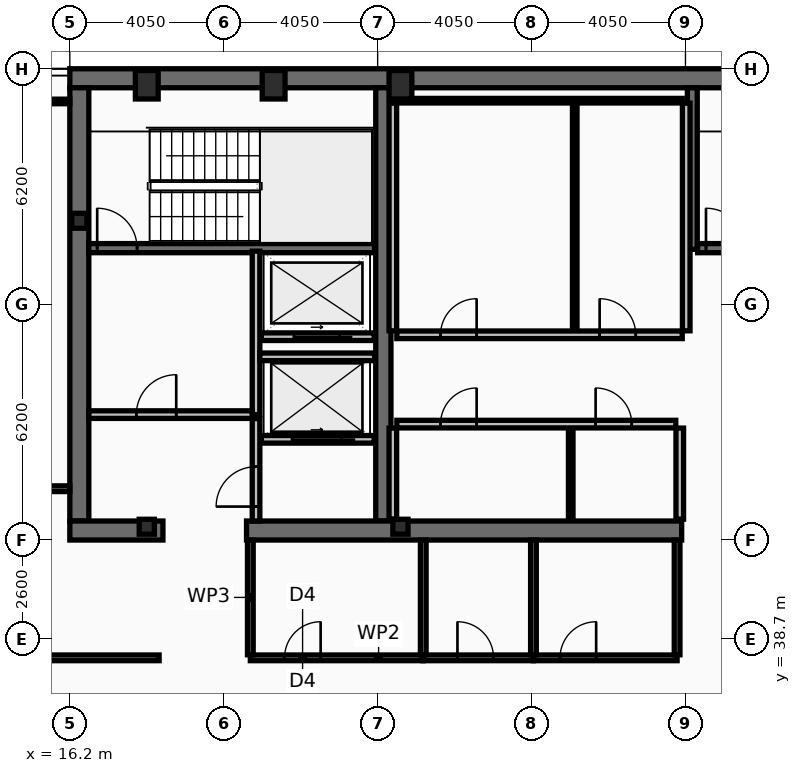
"""IFC4 building model, lengths in metres.
Left out: names, types, materials, properties, quantities, classifications, styles, units other than length and angle.
Written with IfcOpenShell. Run it as: python <this file> out.ifc"""

import sys

from ifc_helpers import new_model, si_unit, direction, frame, frame_2d, origin, origin_2d, place, context, subcontext, project, spatial, rectangle, hollow_rectangle, i_section, extrude, element, fill, save


model = new_model("IFC4")
c1 = context("Model", 3, precision=1e-05, world=origin(), true_north=direction((0.0, 1.0)))
c2 = subcontext(c1, "Body", "Model", "MODEL_VIEW")
j1 = project(units=[si_unit("LENGTHUNIT", "METRE"), si_unit("PLANEANGLEUNIT", "RADIAN")], contexts=[c1])
p1 = place(None, origin())
s1 = spatial("IfcSite", under=j1, at=p1, CompositionType="ELEMENT")
p2 = place(p1, origin())
s2 = spatial("IfcBuilding", under=s1, at=p2, CompositionType="ELEMENT")
p3 = place(p2, frame((0.0, 0.0, 277.0)))
s3 = spatial("IfcBuildingStorey", under=s2, at=p3, CompositionType="ELEMENT", Elevation=277.0)
p4 = place(p3, frame((16.2, 53.45, 0.0), z_axis=(0.0, 0.0, 1.0), x_axis=(1.0, 0.0, 0.0)))
e1 = element("IfcWall", 1, at=p4, inside=s3, PredefinedType="SHEAR", context=c2, shape_type="SweptSolid", body=[
    extrude(rectangle(XDim=40.5, YDim=0.5, at=frame_2d((20.25, 0.0))), origin(), (0.0, 0.0, 1.0), 3.44),
])
p5 = place(p3, frame((16.45, 41.8, 0.0), z_axis=(0.0, 0.0, 1.0), x_axis=(0.0, 1.0, 0.0)))
e2 = element("IfcWall", 2, at=p5, inside=s3, PredefinedType="SHEAR", context=c2, shape_type="SweptSolid", body=[
    extrude(rectangle(XDim=11.4, YDim=0.5, at=frame_2d((5.7, 0.0))), origin(), (0.0, 0.0, 1.0), 3.44),
])
p6 = place(p3, frame((24.45, 41.8, 0.0), z_axis=(0.0, 0.0, 1.0), x_axis=(0.0, 1.0, 0.0)))
e3 = element("IfcWall", 3, at=p6, inside=s3, PredefinedType="SHEAR", context=c2, shape_type="SweptSolid", body=[
    extrude(rectangle(XDim=11.4, YDim=0.4, at=frame_2d((5.7, 0.0))), origin(), (0.0, 0.0, 1.0), 3.44),
])
p7 = place(p3, frame((18.65, 41.55, 0.0), z_axis=(0.0, 0.0, 1.0), x_axis=(-1.0, 0.0, 0.0)))
e4 = element("IfcWall", 4, at=p7, inside=s3, PredefinedType="SHEAR", context=c2, shape_type="SweptSolid", body=[
    extrude(rectangle(XDim=2.45, YDim=0.5, at=frame_2d((1.225, 0.0))), origin(), (0.0, 0.0, 1.0), 3.44),
])
p8 = place(p3, frame((32.3, 41.55, 0.0), z_axis=(0.0, 0.0, 1.0), x_axis=(-1.0, 0.0, 0.0)))
e5 = element("IfcWall", 5, at=p8, inside=s3, PredefinedType="SHEAR", context=c2, shape_type="SweptSolid", body=[
    extrude(rectangle(XDim=11.45, YDim=0.5, at=frame_2d((5.725, 0.0))), origin(), (0.0, 0.0, 1.0), 3.44),
])
p9 = place(p3, frame((32.58, 48.95, 0.0), z_axis=(0.0, 0.0, 1.0), x_axis=(0.0, 1.0, 0.0)))
e6 = element("IfcWall", 6, at=p9, inside=s3, PredefinedType="SHEAR", context=c2, shape_type="SweptSolid", body=[
    extrude(rectangle(XDim=4.25, YDim=0.26, at=frame_2d((2.125, 0.0))), origin(), (0.0, 0.0, 1.0), 3.44),
])
p10 = place(p3, frame((16.7, 48.98, 0.0), z_axis=(0.0, 0.0, 1.0), x_axis=(1.0, 0.0, 0.0)))
e7 = element("IfcWall", 7, at=p10, inside=s3, PredefinedType="SHEAR", context=c2, shape_type="SweptSolid", body=[
    extrude(rectangle(XDim=7.52, YDim=0.24, at=frame_2d((3.76, 0.0))), origin(), (0.0, 0.0, 1.0), 3.44),
])
p11 = place(p10, frame((0.22, 0.0, 0.0)))
e8 = element("IfcOpeningElement", 8, at=p11, cuts=e7, PredefinedType="OPENING", context=c2, shape_type="SweptSolid", body=[
    extrude(rectangle(XDim=1.05, YDim=2.15, at=frame_2d((0.525, 1.075))), frame((0.0, 0.13, 0.0), z_axis=(0.0, -1.0, 0.0), x_axis=(1.0, 0.0, 0.0)), (0.0, 0.0, 1.0), 0.26),
])
p12 = place(p3, frame((32.72, 48.98, 0.0), z_axis=(0.0, 0.0, 1.0), x_axis=(1.0, 0.0, 0.0)))
e9 = element("IfcWall", 9, at=p12, inside=s3, PredefinedType="SHEAR", context=c2, shape_type="SweptSolid", body=[
    extrude(rectangle(XDim=7.56, YDim=0.24, at=frame_2d((3.78, 0.0))), origin(), (0.0, 0.0, 1.0), 3.44),
])
p13 = place(p12, frame((0.22, 0.0, 0.0)))
e10 = element("IfcOpeningElement", 10, at=p13, cuts=e9, PredefinedType="OPENING", context=c2, shape_type="SweptSolid", body=[
    extrude(rectangle(XDim=1.05, YDim=2.15, at=frame_2d((0.525, 1.075))), frame((0.0, 0.13, 0.0), z_axis=(0.0, -1.0, 0.0), x_axis=(1.0, 0.0, 0.0)), (0.0, 0.0, 1.0), 0.26),
])
for number, where, z_axis, x_axis in (
    (11, (18.225, 53.28, 0.0), (0.0, 0.0, 1.0), (1.0, 0.0, 0.0)),
    (12, (21.562, 53.28, 0.0), (0.0, 0.0, 1.0), (1.0, 0.0, 0.0)),
    (13, (24.9, 53.28, 0.0), (0.0, 0.0, 1.0), (1.0, 0.0, 0.0)),
):
    element("IfcColumn", number, at=place(p3, frame(where, z_axis=z_axis, x_axis=x_axis)), inside=s3, PredefinedType="COLUMN", context=c2, shape_type="SweptSolid", body=[
        extrude(hollow_rectangle(XDim=0.6, YDim=0.75, WallThickness=0.045, at=origin_2d()), origin(), (0.0, 0.0, 1.0), 3.6),
    ])
for number, where, z_axis, x_axis in (
    (14, (16.45, 49.7, 0.0), (0.0, 0.0, 1.0), (1.0, 0.0, 0.0)),
    (15, (18.225, 41.65, 0.0), (0.0, 0.0, 1.0), (1.0, 0.0, 0.0)),
    (16, (24.9, 41.65, 0.0), (0.0, 0.0, 1.0), (1.0, 0.0, 0.0)),
):
    element("IfcColumn", number, at=place(p3, frame(where, z_axis=z_axis, x_axis=x_axis)), inside=s3, PredefinedType="COLUMN", context=c2, shape_type="SweptSolid", body=[
        extrude(i_section(OverallWidth=0.399, OverallDepth=0.393, WebThickness=0.023, FlangeThickness=0.037, at=origin_2d()), origin(), (0.0, 0.0, 1.0), 3.6),
    ])
p14 = place(p3, frame((24.21, 43.95, 0.0), z_axis=(0.0, 0.0, 1.0), x_axis=(-1.0, 0.0, 0.0)))
e17 = element("IfcWall", 17, at=p14, inside=s3, PredefinedType="PARTITIONING", context=c2, shape_type="SweptSolid", body=[
    extrude(rectangle(XDim=2.97, YDim=0.2, at=frame_2d((1.485, 0.0))), origin(), (0.0, 0.0, 1.0), 3.44),
])
p15 = place(p14, frame((0.86, 0.0, 0.0)))
e18 = element("IfcOpeningElement", 18, at=p15, cuts=e17, PredefinedType="OPENING", context=c2, shape_type="SweptSolid", body=[
    extrude(rectangle(XDim=1.3, YDim=2.18, at=frame_2d((0.65, 1.09))), frame((0.0, 0.11, 0.0), z_axis=(0.0, -1.0, 0.0), x_axis=(1.0, 0.0, 0.0)), (0.0, 0.0, 1.0), 0.22),
])
p16 = place(p3, frame((24.21, 46.65, 0.0), z_axis=(0.0, 0.0, 1.0), x_axis=(-1.0, 0.0, 0.0)))
e19 = element("IfcWall", 19, at=p16, inside=s3, PredefinedType="PARTITIONING", context=c2, shape_type="SweptSolid", body=[
    extrude(rectangle(XDim=2.97, YDim=0.2, at=frame_2d((1.485, 0.0))), origin(), (0.0, 0.0, 1.0), 3.44),
])
p17 = place(p16, frame((0.91, 0.0, 0.0)))
e20 = element("IfcOpeningElement", 20, at=p17, cuts=e19, PredefinedType="OPENING", context=c2, shape_type="SweptSolid", body=[
    extrude(rectangle(XDim=1.2, YDim=2.18, at=frame_2d((0.6, 1.09))), frame((0.0, 0.11, 0.0), z_axis=(0.0, -1.0, 0.0), x_axis=(1.0, 0.0, 0.0)), (0.0, 0.0, 1.0), 0.22),
])
p18 = place(p3, frame((21.1, 44.6, 0.0), z_axis=(0.0, 0.0, 1.0), x_axis=(0.0, 1.0, 0.0)))
e21 = element("IfcWall", 21, at=p18, inside=s3, PredefinedType="PARTITIONING", context=c2, shape_type="SweptSolid", body=[
    extrude(rectangle(XDim=4.3, YDim=0.2, at=frame_2d((2.15, 0.0))), origin(), (0.0, 0.0, 1.0), 3.44),
])
p19 = place(p3, frame((16.7, 44.6, 0.0), z_axis=(0.0, 0.0, 1.0), x_axis=(1.0, 0.0, 0.0)))
e22 = element("IfcWall", 22, at=p19, inside=s3, PredefinedType="PARTITIONING", context=c2, shape_type="SweptSolid", body=[
    extrude(rectangle(XDim=4.3, YDim=0.2, at=frame_2d((2.15, 0.0))), origin(), (0.0, 0.0, 1.0), 3.44),
])
p20 = place(p19, frame((1.25, 0.0, 0.0)))
e23 = element("IfcOpeningElement", 23, at=p20, cuts=e22, PredefinedType="OPENING", context=c2, shape_type="SweptSolid", body=[
    extrude(rectangle(XDim=1.05, YDim=2.15, at=frame_2d((0.525, 1.075))), frame((0.0, 0.11, 0.0), z_axis=(0.0, -1.0, 0.0), x_axis=(1.0, 0.0, 0.0)), (0.0, 0.0, 1.0), 0.22),
])
p21 = place(p3, frame((21.2, 46.12, 0.0), z_axis=(0.0, 0.0, 1.0), x_axis=(1.0, 0.0, 0.0)))
e24 = element("IfcWall", 24, at=p21, inside=s3, PredefinedType="PARTITIONING", context=c2, shape_type="SweptSolid", body=[
    extrude(rectangle(XDim=3.02, YDim=0.2, at=frame_2d((1.51, 0.0))), origin(), (0.0, 0.0, 1.0), 3.44),
])
p22 = place(p3, frame((21.1, 41.8, 0.0), z_axis=(0.0, 0.0, 1.0), x_axis=(0.0, 1.0, 0.0)))
e25 = element("IfcWall", 25, at=p22, inside=s3, PredefinedType="PARTITIONING", context=c2, shape_type="SweptSolid", body=[
    extrude(rectangle(XDim=2.695, YDim=0.2, at=frame_2d((1.348, 0.0))), origin(), (0.0, 0.0, 1.0), 3.44),
])
p23 = place(p22, frame((0.38, 0.0, 0.0)))
e26 = element("IfcOpeningElement", 26, at=p23, cuts=e25, PredefinedType="OPENING", context=c2, shape_type="SweptSolid", body=[
    extrude(rectangle(XDim=1.05, YDim=2.15, at=frame_2d((0.525, 1.075))), frame((0.0, 0.11, 0.0), z_axis=(0.0, -1.0, 0.0), x_axis=(1.0, 0.0, 0.0)), (0.0, 0.0, 1.0), 0.22),
])
for number, where, z_axis, x_axis in (
    (27, (24.7, 46.805, 0.0), (0.0, 0.0, 1.0), (0.0, 1.0, 0.0)),
    (28, (32.42, 46.805, 0.0), (0.0, 0.0, 1.0), (0.0, 1.0, 0.0)),
):
    element("IfcWall", number, at=place(p3, frame(where, z_axis=z_axis, x_axis=x_axis)), inside=s3, PredefinedType="PARTITIONING", context=c2, shape_type="SweptSolid", body=[
        extrude(rectangle(XDim=5.99, YDim=0.2, at=frame_2d((2.995, 0.0))), origin(), (0.0, 0.0, 1.0), 3.44),
    ])
p24 = place(p3, frame((24.805, 52.86, 0.0), z_axis=(0.0, 0.0, 1.0), x_axis=(1.0, 0.0, 0.0)))
e29 = element("IfcWall", 29, at=p24, inside=s3, PredefinedType="PARTITIONING", context=c2, shape_type="SweptSolid", body=[
    extrude(rectangle(XDim=7.51, YDim=0.12, at=frame_2d((3.755, 0.0))), origin(), (0.0, 0.0, 1.0), 3.44),
])
p25 = place(p3, frame((29.486, 46.805, 0.0), z_axis=(0.0, 0.0, 1.0), x_axis=(0.0, 1.0, 0.0)))
e30 = element("IfcWall", 30, at=p25, inside=s3, PredefinedType="PARTITIONING", context=c2, shape_type="SweptSolid", body=[
    extrude(rectangle(XDim=5.99, YDim=0.12, at=frame_2d((2.995, 0.0))), origin(), (0.0, 0.0, 1.0), 3.44),
])
p26 = place(p3, frame((24.805, 46.7, 0.0), z_axis=(0.0, 0.0, 1.0), x_axis=(1.0, 0.0, 0.0)))
e31 = element("IfcWall", 31, at=p26, inside=s3, PredefinedType="PARTITIONING", context=c2, shape_type="SweptSolid", body=[
    extrude(rectangle(XDim=7.51, YDim=0.2, at=frame_2d((3.755, 0.0))), origin(), (0.0, 0.0, 1.0), 3.44),
])
p27 = place(p26, frame((1.15, 0.0, 0.0)))
e32 = element("IfcOpeningElement", 32, at=p27, cuts=e31, PredefinedType="OPENING", context=c2, shape_type="SweptSolid", body=[
    extrude(rectangle(XDim=0.95, YDim=2.1, at=frame_2d((0.475, 1.05))), frame((0.0, 0.11, 0.0), z_axis=(0.0, -1.0, 0.0), x_axis=(1.0, 0.0, 0.0)), (0.0, 0.0, 1.0), 0.22),
])
p28 = place(p26, frame((5.336, 0.0, 0.0)))
e33 = element("IfcOpeningElement", 33, at=p28, cuts=e31, PredefinedType="OPENING", context=c2, shape_type="SweptSolid", body=[
    extrude(rectangle(XDim=0.95, YDim=2.1, at=frame_2d((0.475, 1.05))), frame((0.0, 0.11, 0.0), z_axis=(0.0, -1.0, 0.0), x_axis=(1.0, 0.0, 0.0)), (0.0, 0.0, 1.0), 0.22),
])
for number, where, z_axis, x_axis in (
    (34, (24.7, 41.85, 0.0), (0.0, 0.0, 1.0), (0.0, 1.0, 0.0)),
    (35, (32.25, 41.85, 0.0), (0.0, 0.0, 1.0), (0.0, 1.0, 0.0)),
):
    element("IfcWall", number, at=place(p3, frame(where, z_axis=z_axis, x_axis=x_axis)), inside=s3, PredefinedType="PARTITIONING", context=c2, shape_type="SweptSolid", body=[
        extrude(rectangle(XDim=2.395, YDim=0.2, at=frame_2d((1.198, 0.0))), origin(), (0.0, 0.0, 1.0), 3.44),
    ])
p29 = place(p3, frame((29.381, 41.85, 0.0), z_axis=(0.0, 0.0, 1.0), x_axis=(0.0, 1.0, 0.0)))
e36 = element("IfcWall", 36, at=p29, inside=s3, PredefinedType="PARTITIONING", context=c2, shape_type="SweptSolid", body=[
    extrude(rectangle(XDim=2.395, YDim=0.12, at=frame_2d((1.198, 0.0))), origin(), (0.0, 0.0, 1.0), 3.44),
])
p30 = place(p3, frame((24.805, 44.35, 0.0), z_axis=(0.0, 0.0, 1.0), x_axis=(1.0, 0.0, 0.0)))
e37 = element("IfcWall", 37, at=p30, inside=s3, PredefinedType="PARTITIONING", context=c2, shape_type="SweptSolid", body=[
    extrude(rectangle(XDim=7.34, YDim=0.2, at=frame_2d((3.67, 0.0))), origin(), (0.0, 0.0, 1.0), 3.44),
])
p31 = place(p30, frame((1.15, 0.0, 0.0)))
e38 = element("IfcOpeningElement", 38, at=p31, cuts=e37, PredefinedType="OPENING", context=c2, shape_type="SweptSolid", body=[
    extrude(rectangle(XDim=0.95, YDim=2.1, at=frame_2d((0.475, 1.05))), frame((0.0, 0.11, 0.0), z_axis=(0.0, -1.0, 0.0), x_axis=(1.0, 0.0, 0.0)), (0.0, 0.0, 1.0), 0.22),
])
p32 = place(p30, frame((5.231, 0.0, 0.0)))
e39 = element("IfcOpeningElement", 39, at=p32, cuts=e37, PredefinedType="OPENING", context=c2, shape_type="SweptSolid", body=[
    extrude(rectangle(XDim=0.95, YDim=2.1, at=frame_2d((0.475, 1.05))), frame((0.0, 0.11, 0.0), z_axis=(0.0, -1.0, 0.0), x_axis=(1.0, 0.0, 0.0)), (0.0, 0.0, 1.0), 0.22),
])
p33 = place(p3, frame((20.95, 38.2, 0.0), z_axis=(0.0, 0.0, 1.0), x_axis=(1.0, 0.0, 0.0)))
e40 = element("IfcWall", 40, at=p33, inside=s3, PredefinedType="PARTITIONING", context=c2, shape_type="SweptSolid", body=[
    extrude(rectangle(XDim=4.55, YDim=0.15, at=frame_2d((2.275, 0.0))), origin(), (0.0, 0.0, 1.0), 2.78),
])
p34 = place(p33, frame((0.9, 0.0, 0.0)))
e41 = element("IfcOpeningElement", 41, at=p34, cuts=e40, PredefinedType="OPENING", context=c2, shape_type="SweptSolid", body=[
    extrude(rectangle(XDim=0.95, YDim=2.05, at=frame_2d((0.475, 1.025))), frame((0.0, 0.085, 0.0), z_axis=(0.0, -1.0, 0.0), x_axis=(1.0, 0.0, 0.0)), (0.0, 0.0, 1.0), 0.17),
])
p35 = place(p3, frame((25.5, 38.2, 0.0), z_axis=(0.0, 0.0, 1.0), x_axis=(1.0, 0.0, 0.0)))
e42 = element("IfcWall", 42, at=p35, inside=s3, PredefinedType="PARTITIONING", context=c2, shape_type="SweptSolid", body=[
    extrude(rectangle(XDim=2.9, YDim=0.15, at=frame_2d((1.45, 0.0))), origin(), (0.0, 0.0, 1.0), 3.44),
])
p36 = place(p35, frame((0.9, 0.0, 0.0)))
e43 = element("IfcOpeningElement", 43, at=p36, cuts=e42, PredefinedType="OPENING", context=c2, shape_type="SweptSolid", body=[
    extrude(rectangle(XDim=0.95, YDim=2.05, at=frame_2d((0.475, 1.025))), frame((0.0, 0.085, 0.0), z_axis=(0.0, -1.0, 0.0), x_axis=(1.0, 0.0, 0.0)), (0.0, 0.0, 1.0), 0.17),
])
p37 = place(p3, frame((28.4, 38.2, 0.0), z_axis=(0.0, 0.0, 1.0), x_axis=(1.0, 0.0, 0.0)))
e44 = element("IfcWall", 44, at=p37, inside=s3, PredefinedType="PARTITIONING", context=c2, shape_type="SweptSolid", body=[
    extrude(rectangle(XDim=3.78, YDim=0.15, at=frame_2d((1.89, 0.0))), origin(), (0.0, 0.0, 1.0), 2.78),
])
p38 = place(p37, frame((0.7, 0.0, 0.0)))
e45 = element("IfcOpeningElement", 45, at=p38, cuts=e44, PredefinedType="OPENING", context=c2, shape_type="SweptSolid", body=[
    extrude(rectangle(XDim=0.95, YDim=2.05, at=frame_2d((0.475, 1.025))), frame((0.0, 0.085, 0.0), z_axis=(0.0, -1.0, 0.0), x_axis=(1.0, 0.0, 0.0)), (0.0, 0.0, 1.0), 0.17),
])
for number, where, z_axis, x_axis in (
    (46, (20.95, 38.28, 0.0), (0.0, 0.0, 1.0), (0.0, 1.0, 0.0)),
    (47, (25.5, 38.28, 0.0), (0.0, 0.0, 1.0), (0.0, 1.0, 0.0)),
    (48, (28.4, 38.28, 0.0), (0.0, 0.0, 1.0), (0.0, 1.0, 0.0)),
    (49, (32.18, 38.28, 0.0), (0.0, 0.0, 1.0), (0.0, 1.0, 0.0)),
):
    element("IfcWall", number, at=place(p3, frame(where, z_axis=z_axis, x_axis=x_axis)), inside=s3, PredefinedType="PARTITIONING", context=c2, shape_type="SweptSolid", body=[
        extrude(rectangle(XDim=3.02, YDim=0.15, at=frame_2d((1.51, 0.0))), origin(), (0.0, 0.0, 1.0), 3.44),
    ])
p39 = place(p3, frame((10.03, 38.2, 0.0), z_axis=(0.0, 0.0, 1.0), x_axis=(1.0, 0.0, 0.0)))
e50 = element("IfcWall", 50, at=p39, inside=s3, PredefinedType="PARTITIONING", context=c2, shape_type="SweptSolid", body=[
    extrude(rectangle(XDim=8.52, YDim=0.15, at=frame_2d((4.26, 0.0))), origin(), (0.0, 0.0, 1.0), 2.78),
])
p40 = place(p39, frame((4.32, 0.0, 0.0)))
e51 = element("IfcOpeningElement", 51, at=p40, cuts=e50, PredefinedType="OPENING", context=c2, shape_type="SweptSolid", body=[
    extrude(rectangle(XDim=0.95, YDim=2.05, at=frame_2d((0.475, 1.025))), frame((0.0, 0.085, 0.0), z_axis=(0.0, -1.0, 0.0), x_axis=(1.0, 0.0, 0.0)), (0.0, 0.0, 1.0), 0.17),
])
p41 = place(p3, frame((10.095, 42.65, 0.0), z_axis=(0.0, 0.0, 1.0), x_axis=(1.0, 0.0, 0.0)))
e52 = element("IfcWall", 52, at=p41, inside=s3, PredefinedType="PARTITIONING", context=c2, shape_type="SweptSolid", body=[
    extrude(rectangle(XDim=6.105, YDim=0.15, at=frame_2d((3.052, 0.0))), origin(), (0.0, 0.0, 1.0), 2.78),
])
p42 = place(p41, frame((4.32, 0.0, 0.0)))
e53 = element("IfcOpeningElement", 53, at=p42, cuts=e52, PredefinedType="OPENING", context=c2, shape_type="SweptSolid", body=[
    extrude(rectangle(XDim=0.9, YDim=2.05, at=frame_2d((0.45, 1.025))), frame((0.0, 0.085, 0.0), z_axis=(0.0, -1.0, 0.0), x_axis=(1.0, 0.0, 0.0)), (0.0, 0.0, 1.0), 0.17),
])
p43 = place(p3, frame((10.095, 52.84, 0.0), z_axis=(0.0, 0.0, 1.0), x_axis=(1.0, 0.0, 0.0)))
e54 = element("IfcWall", 54, at=p43, inside=s3, PredefinedType="PARTITIONING", context=c2, shape_type="SweptSolid", body=[
    extrude(rectangle(XDim=6.105, YDim=0.12, at=frame_2d((3.052, 0.0))), origin(), (0.0, 0.0, 1.0), 3.44),
])
p44 = place(p11, origin())
e55 = element("IfcDoor", 55, at=p44, inside=s3, OperationType="SINGLE_SWING_LEFT", PredefinedType="DOOR", context=c2, shape_type="SweptSolid", body=[
    extrude(rectangle(XDim=1.05, YDim=2.15, at=frame_2d((0.525, 1.075))), frame((0.0, 0.025, 0.0), z_axis=(0.0, -1.0, 0.0), x_axis=(1.0, 0.0, 0.0)), (0.0, 0.0, 1.0), 0.05),
])
fill(e8, e55)
p45 = place(p13, origin())
e56 = element("IfcDoor", 56, at=p45, inside=s3, OperationType="SINGLE_SWING_LEFT", PredefinedType="DOOR", context=c2, shape_type="SweptSolid", body=[
    extrude(rectangle(XDim=1.05, YDim=2.15, at=frame_2d((0.525, 1.075))), frame((0.0, 0.025, 0.0), z_axis=(0.0, -1.0, 0.0), x_axis=(1.0, 0.0, 0.0)), (0.0, 0.0, 1.0), 0.05),
])
fill(e10, e56)
p46 = place(p15, origin())
e57 = element("IfcDoor", 57, at=p46, inside=s3, OperationType="SLIDING_TO_LEFT", PredefinedType="DOOR", context=c2, shape_type="SweptSolid", body=[
    extrude(rectangle(XDim=1.3, YDim=2.18, at=frame_2d((0.65, 1.09))), frame((0.0, 0.025, 0.0), z_axis=(0.0, -1.0, 0.0), x_axis=(1.0, 0.0, 0.0)), (0.0, 0.0, 1.0), 0.05),
])
fill(e18, e57)
p47 = place(p17, origin())
e58 = element("IfcDoor", 58, at=p47, inside=s3, OperationType="SLIDING_TO_LEFT", PredefinedType="DOOR", context=c2, shape_type="SweptSolid", body=[
    extrude(rectangle(XDim=1.2, YDim=2.18, at=frame_2d((0.6, 1.09))), frame((0.0, 0.025, 0.0), z_axis=(0.0, -1.0, 0.0), x_axis=(1.0, 0.0, 0.0)), (0.0, 0.0, 1.0), 0.05),
])
fill(e20, e58)
p48 = place(p20, origin())
e59 = element("IfcDoor", 59, at=p48, inside=s3, OperationType="SINGLE_SWING_RIGHT", PredefinedType="DOOR", context=c2, shape_type="SweptSolid", body=[
    extrude(rectangle(XDim=1.05, YDim=2.15, at=frame_2d((0.525, 1.075))), frame((0.0, 0.025, 0.0), z_axis=(0.0, -1.0, 0.0), x_axis=(1.0, 0.0, 0.0)), (0.0, 0.0, 1.0), 0.05),
])
fill(e23, e59)
p49 = place(p23, origin())
e60 = element("IfcDoor", 60, at=p49, inside=s3, OperationType="SINGLE_SWING_LEFT", PredefinedType="DOOR", context=c2, shape_type="SweptSolid", body=[
    extrude(rectangle(XDim=1.05, YDim=2.15, at=frame_2d((0.525, 1.075))), frame((0.0, 0.025, 0.0), z_axis=(0.0, -1.0, 0.0), x_axis=(1.0, 0.0, 0.0)), (0.0, 0.0, 1.0), 0.05),
])
fill(e26, e60)
p50 = place(p27, origin())
e61 = element("IfcDoor", 61, at=p50, inside=s3, OperationType="SINGLE_SWING_RIGHT", PredefinedType="DOOR", context=c2, shape_type="SweptSolid", body=[
    extrude(rectangle(XDim=0.95, YDim=2.1, at=frame_2d((0.475, 1.05))), frame((0.0, 0.025, 0.0), z_axis=(0.0, -1.0, 0.0), x_axis=(1.0, 0.0, 0.0)), (0.0, 0.0, 1.0), 0.05),
])
fill(e32, e61)
p51 = place(p28, origin())
e62 = element("IfcDoor", 62, at=p51, inside=s3, OperationType="SINGLE_SWING_LEFT", PredefinedType="DOOR", context=c2, shape_type="SweptSolid", body=[
    extrude(rectangle(XDim=0.95, YDim=2.1, at=frame_2d((0.475, 1.05))), frame((0.0, 0.025, 0.0), z_axis=(0.0, -1.0, 0.0), x_axis=(1.0, 0.0, 0.0)), (0.0, 0.0, 1.0), 0.05),
])
fill(e33, e62)
p52 = place(p31, origin())
e63 = element("IfcDoor", 63, at=p52, inside=s3, OperationType="SINGLE_SWING_RIGHT", PredefinedType="DOOR", context=c2, shape_type="SweptSolid", body=[
    extrude(rectangle(XDim=0.95, YDim=2.1, at=frame_2d((0.475, 1.05))), frame((0.0, 0.025, 0.0), z_axis=(0.0, -1.0, 0.0), x_axis=(1.0, 0.0, 0.0)), (0.0, 0.0, 1.0), 0.05),
])
fill(e38, e63)
p53 = place(p32, origin())
e64 = element("IfcDoor", 64, at=p53, inside=s3, OperationType="SINGLE_SWING_LEFT", PredefinedType="DOOR", context=c2, shape_type="SweptSolid", body=[
    extrude(rectangle(XDim=0.95, YDim=2.1, at=frame_2d((0.475, 1.05))), frame((0.0, 0.025, 0.0), z_axis=(0.0, -1.0, 0.0), x_axis=(1.0, 0.0, 0.0)), (0.0, 0.0, 1.0), 0.05),
])
fill(e39, e64)
p54 = place(p34, origin())
e65 = element("IfcDoor", 65, at=p54, inside=s3, OperationType="SINGLE_SWING_RIGHT", PredefinedType="DOOR", context=c2, shape_type="SweptSolid", body=[
    extrude(rectangle(XDim=0.95, YDim=2.05, at=frame_2d((0.475, 1.025))), frame((0.0, 0.025, 0.0), z_axis=(0.0, -1.0, 0.0), x_axis=(1.0, 0.0, 0.0)), (0.0, 0.0, 1.0), 0.05),
])
fill(e41, e65)
p55 = place(p36, origin())
e66 = element("IfcDoor", 66, at=p55, inside=s3, OperationType="SINGLE_SWING_LEFT", PredefinedType="DOOR", context=c2, shape_type="SweptSolid", body=[
    extrude(rectangle(XDim=0.95, YDim=2.05, at=frame_2d((0.475, 1.025))), frame((0.0, 0.025, 0.0), z_axis=(0.0, -1.0, 0.0), x_axis=(1.0, 0.0, 0.0)), (0.0, 0.0, 1.0), 0.05),
])
fill(e43, e66)
p56 = place(p38, origin())
e67 = element("IfcDoor", 67, at=p56, inside=s3, OperationType="SINGLE_SWING_RIGHT", PredefinedType="DOOR", context=c2, shape_type="SweptSolid", body=[
    extrude(rectangle(XDim=0.95, YDim=2.05, at=frame_2d((0.475, 1.025))), frame((0.0, 0.025, 0.0), z_axis=(0.0, -1.0, 0.0), x_axis=(1.0, 0.0, 0.0)), (0.0, 0.0, 1.0), 0.05),
])
fill(e45, e67)
save(model, sys.argv[1])
